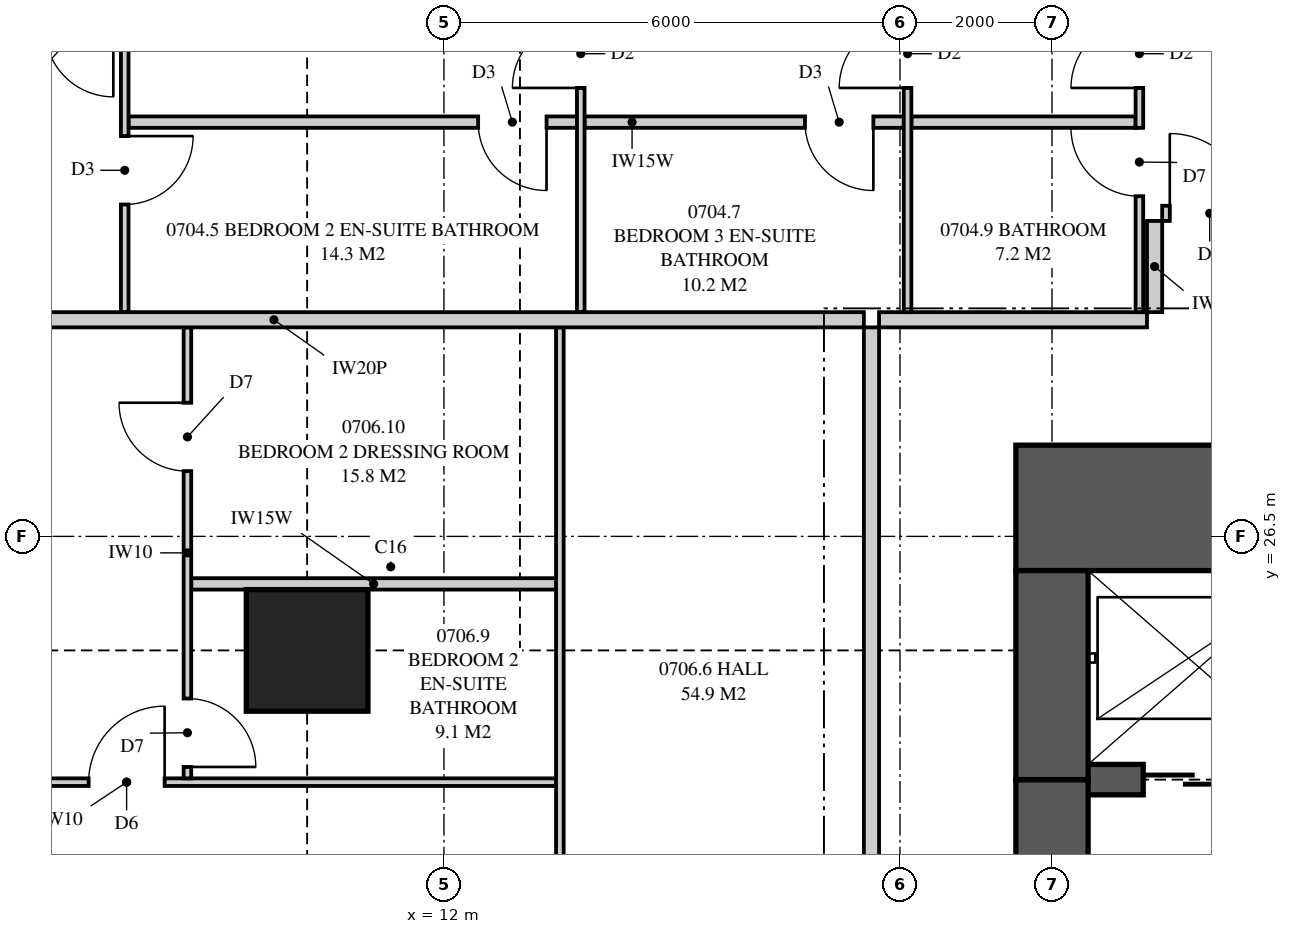
"""IFC4 building model, lengths in metres.
Left out: names, types, materials, properties, quantities, classifications, styles, units other than length and angle.
Written with IfcOpenShell. Run it as: python <this file> out.ifc"""

import sys

from ifc_helpers import new_model, si_unit, direction, frame, frame_2d, origin, origin_2d, place, context, subcontext, project, spatial, polyline, rectangle, outline, extrude, element, fill, save


model = new_model("IFC4")
c1 = context("Model", 3, precision=1e-05, world=origin(), true_north=direction((0.0, 1.0)))
c2 = subcontext(c1, "Body", "Model", "MODEL_VIEW")
j1 = project(units=[si_unit("LENGTHUNIT", "METRE"), si_unit("PLANEANGLEUNIT", "RADIAN")], contexts=[c1])
p1 = place(None, origin())
s1 = spatial("IfcSite", under=j1, at=p1, CompositionType="ELEMENT")
p2 = place(p1, origin())
s2 = spatial("IfcBuilding", under=s1, at=p2, CompositionType="ELEMENT")
p3 = place(p2, frame((0.0, 0.0, 31.05)))
s3 = spatial("IfcBuildingStorey", under=s2, at=p3, CompositionType="ELEMENT", Elevation=31.05)
p4 = place(p3, frame((10.2, 25.0, 0.0), z_axis=(0.0, 0.0, 1.0), x_axis=(1.0, 0.0, 0.0)))
e1 = element("IfcColumn", 1, at=p4, inside=s3, PredefinedType="COLUMN", context=c2, shape_type="SweptSolid", body=[
    extrude(rectangle(XDim=1.6, YDim=1.6, at=origin_2d()), origin(), (0.0, 0.0, 1.0), 3.35),
])
p5 = place(p3, frame((26.0, 26.875, 0.0), z_axis=(0.0, 0.0, 1.0), x_axis=(-1.0, 0.0, 0.0)))
e2 = element("IfcWall", 2, at=p5, inside=s3, PredefinedType="SHEAR", context=c2, shape_type="SweptSolid", body=[
    extrude(rectangle(XDim=6.475, YDim=1.65, at=frame_2d((3.238, 0.0))), origin(), (0.0, 0.0, 1.0), 3.35),
])
p6 = place(p5, frame((0.825, 0.0, 0.0)))
e3 = element("IfcOpeningElement", 3, at=p6, cuts=e2, PredefinedType="OPENING", context=c2, shape_type="SweptSolid", body=[
    extrude(rectangle(XDim=0.75, YDim=2.1, at=frame_2d((0.375, 1.05))), frame((0.0, 0.835, 0.0), z_axis=(0.0, -1.0, 0.0), x_axis=(1.0, 0.0, 0.0)), (0.0, 0.0, 1.0), 1.67),
])
p7 = place(p3, frame((20.0, 26.05, 0.0), z_axis=(0.0, 0.0, 1.0), x_axis=(0.0, -1.0, 0.0)))
e4 = element("IfcWall", 4, at=p7, inside=s3, PredefinedType="SHEAR", context=c2, shape_type="SweptSolid", body=[
    extrude(rectangle(XDim=2.75, YDim=0.95, at=frame_2d((1.375, 0.0))), origin(), (0.0, 0.0, 1.0), 3.35),
])
p8 = place(p3, frame((20.0, 23.3, 0.0), z_axis=(0.0, 0.0, 1.0), x_axis=(0.0, -1.0, 0.0)))
e5 = element("IfcWall", 5, at=p8, inside=s3, PredefinedType="SHEAR", context=c2, shape_type="SweptSolid", body=[
    extrude(rectangle(XDim=5.6, YDim=0.95, at=frame_2d((2.8, 0.0))), origin(), (0.0, 0.0, 1.0), 3.35),
])
p9 = place(p8, frame((3.4, 0.0, 0.0)))
e6 = element("IfcOpeningElement", 6, at=p9, cuts=e5, PredefinedType="OPENING", context=c2, shape_type="SweptSolid", body=[
    extrude(rectangle(XDim=1.2, YDim=2.2, at=frame_2d((0.6, 1.1))), frame((0.0, 0.485, 0.0), z_axis=(0.0, -1.0, 0.0), x_axis=(1.0, 0.0, 0.0)), (0.0, 0.0, 1.0), 0.97),
])
p10 = place(p3, frame((20.0, 23.3, 0.0), z_axis=(0.0, 0.0, 1.0), x_axis=(1.0, 0.0, 0.0)))
e7 = element("IfcWall", 7, at=p10, inside=s3, PredefinedType="SHEAR", context=c2, shape_type="SweptSolid", body=[
    extrude(rectangle(XDim=3.6, YDim=0.4, at=frame_2d((1.8, 0.0))), origin(), (0.0, 0.0, 1.0), 3.35),
])
p11 = place(p10, frame((1.2, 0.0, 0.0)))
e8 = element("IfcOpeningElement", 8, at=p11, cuts=e7, PredefinedType="OPENING", context=c2, shape_type="SweptSolid", body=[
    extrude(rectangle(XDim=1.2, YDim=2.1, at=frame_2d((0.6, 1.05))), frame((0.0, 0.21, 0.0), z_axis=(0.0, -1.0, 0.0), x_axis=(1.0, 0.0, 0.0)), (0.0, 0.0, 1.0), 0.42),
])
p12 = place(p3, frame((17.725, 29.35, 0.0), z_axis=(0.0, 0.0, 1.0), x_axis=(1.0, 0.0, 0.0)))
e9 = element("IfcWall", 9, at=p12, inside=s3, PredefinedType="PARTITIONING", context=c2, shape_type="SweptSolid", body=[
    extrude(rectangle(XDim=3.525, YDim=0.2, at=frame_2d((1.762, 0.0))), origin(), (0.0, 0.0, 1.0), 3.11),
])
p13 = place(p3, frame((7.8, 37.825, 0.0), z_axis=(0.0, 0.0, 1.0), x_axis=(0.0, -1.0, 0.0)))
e10 = element("IfcWall", 10, at=p13, inside=s3, PredefinedType="PARTITIONING", context=c2, shape_type="SweptSolid", body=[
    extrude(outline(polyline([(0.0, 0.0), (8.375, 0.0), (8.375, 3.11), (2.697, 3.11), (2.697, 2.15), (0.943, 2.15), (0.943, 3.11), (0.0, 3.11), (0.0, 0.0)])), frame((0.0, 0.05, 0.0), z_axis=(0.0, -1.0, 0.0), x_axis=(1.0, 0.0, 0.0)), (0.0, 0.0, 1.0), 0.1),
])
p14 = place(p13, frame((2.842, 0.0, 0.0)))
e11 = element("IfcOpeningElement", 11, at=p14, cuts=e10, PredefinedType="OPENING", context=c2, shape_type="SweptSolid", body=[
    extrude(rectangle(XDim=0.9, YDim=2.1, at=frame_2d((0.45, 1.05))), frame((0.0, 0.06, 0.0), z_axis=(0.0, -1.0, 0.0), x_axis=(1.0, 0.0, 0.0)), (0.0, 0.0, 1.0), 0.12),
])
p15 = place(p13, frame((6.059, 0.0, 0.0)))
e12 = element("IfcOpeningElement", 12, at=p15, cuts=e10, PredefinedType="OPENING", context=c2, shape_type="SweptSolid", body=[
    extrude(rectangle(XDim=0.9, YDim=2.1, at=frame_2d((0.45, 1.05))), frame((0.0, 0.06, 0.0), z_axis=(0.0, -1.0, 0.0), x_axis=(1.0, 0.0, 0.0)), (0.0, 0.0, 1.0), 0.12),
])
p16 = place(p3, frame((13.8, 37.825, 0.0), z_axis=(0.0, 0.0, 1.0), x_axis=(0.0, -1.0, 0.0)))
e13 = element("IfcWall", 13, at=p16, inside=s3, PredefinedType="PARTITIONING", context=c2, shape_type="SweptSolid", body=[
    extrude(outline(polyline([(1.635, 2.15), (0.0, 2.15), (0.0, 0.0), (8.375, 0.0), (8.375, 3.11), (1.635, 3.11), (1.635, 2.15)]), holes=[polyline([(1.021, 0.126), (0.529, 0.126), (0.529, 0.919), (1.021, 0.919), (1.021, 0.126)]), polyline([(1.021, 1.231), (0.529, 1.231), (0.529, 2.024), (1.021, 2.024), (1.021, 1.231)])]), frame((0.0, 0.05, 0.0), z_axis=(0.0, -1.0, 0.0), x_axis=(1.0, 0.0, 0.0)), (0.0, 0.0, 1.0), 0.1),
])
p17 = place(p16, frame((4.525, 0.0, 0.0)))
e14 = element("IfcOpeningElement", 14, at=p17, cuts=e13, PredefinedType="OPENING", context=c2, shape_type="SweptSolid", body=[
    extrude(rectangle(XDim=0.9, YDim=2.1, at=frame_2d((0.45, 1.05))), frame((0.0, 0.06, 0.0), z_axis=(0.0, -1.0, 0.0), x_axis=(1.0, 0.0, 0.0)), (0.0, 0.0, 1.0), 0.12),
])
p18 = place(p3, frame((18.1, 37.825, 0.0), z_axis=(0.0, 0.0, 1.0), x_axis=(0.0, -1.0, 0.0)))
e15 = element("IfcWall", 15, at=p18, inside=s3, PredefinedType="PARTITIONING", context=c2, shape_type="SweptSolid", body=[
    extrude(outline(polyline([(0.0, 0.0), (8.375, 0.0), (8.375, 3.11), (1.635, 3.11), (1.635, 2.15), (0.0, 2.15), (0.0, 3.11), (0.0, 0.0)])), frame((0.0, 0.05, 0.0), z_axis=(0.0, -1.0, 0.0), x_axis=(1.0, 0.0, 0.0)), (0.0, 0.0, 1.0), 0.1),
])
p19 = place(p18, frame((4.525, 0.0, 0.0)))
e16 = element("IfcOpeningElement", 16, at=p19, cuts=e15, PredefinedType="OPENING", context=c2, shape_type="SweptSolid", body=[
    extrude(rectangle(XDim=0.9, YDim=2.1, at=frame_2d((0.45, 1.05))), frame((0.0, 0.06, 0.0), z_axis=(0.0, -1.0, 0.0), x_axis=(1.0, 0.0, 0.0)), (0.0, 0.0, 1.0), 0.12),
])
p20 = place(p3, frame((21.15, 37.825, 0.0), z_axis=(0.0, 0.0, 1.0), x_axis=(0.0, -1.0, 0.0)))
e17 = element("IfcWall", 17, at=p20, inside=s3, PredefinedType="PARTITIONING", context=c2, shape_type="SweptSolid", body=[
    extrude(outline(polyline([(0.0, 0.0), (8.375, 0.0), (8.375, 3.11), (1.635, 3.11), (1.635, 2.15), (0.0, 2.15), (0.0, 3.11), (0.0, 0.0)])), frame((0.0, 0.05, 0.0), z_axis=(0.0, -1.0, 0.0), x_axis=(1.0, 0.0, 0.0)), (0.0, 0.0, 1.0), 0.1),
])
p21 = place(p20, frame((4.525, 0.0, 0.0)))
e18 = element("IfcOpeningElement", 18, at=p21, cuts=e17, PredefinedType="OPENING", context=c2, shape_type="SweptSolid", body=[
    extrude(rectangle(XDim=0.9, YDim=2.1, at=frame_2d((0.45, 1.05))), frame((0.0, 0.06, 0.0), z_axis=(0.0, -1.0, 0.0), x_axis=(1.0, 0.0, 0.0)), (0.0, 0.0, 1.0), 0.12),
])
p22 = place(p20, frame((5.95, 0.0, 0.0)))
e19 = element("IfcOpeningElement", 19, at=p22, cuts=e17, PredefinedType="OPENING", context=c2, shape_type="SweptSolid", body=[
    extrude(rectangle(XDim=0.9, YDim=2.1, at=frame_2d((0.45, 1.05))), frame((0.0, 0.06, 0.0), z_axis=(0.0, -1.0, 0.0), x_axis=(1.0, 0.0, 0.0)), (0.0, 0.0, 1.0), 0.12),
])
p23 = place(p3, frame((7.85, 31.95, 0.0), z_axis=(0.0, 0.0, 1.0), x_axis=(1.0, 0.0, 0.0)))
e20 = element("IfcWall", 20, at=p23, inside=s3, PredefinedType="PLUMBINGWALL", context=c2, shape_type="SweptSolid", body=[
    extrude(outline(polyline([(0.0, 0.0), (5.9, 0.0), (5.9, 3.11), (5.462, 3.11), (5.462, 2.541), (4.838, 2.541), (4.838, 3.11), (3.635, 3.11), (3.635, 2.51), (1.065, 2.51), (1.065, 3.11), (0.0, 3.11), (0.0, 0.0)])), frame((0.0, 0.075, 0.0), z_axis=(0.0, -1.0, 0.0), x_axis=(1.0, 0.0, 0.0)), (0.0, 0.0, 1.0), 0.15),
])
p24 = place(p23, frame((4.6, 0.0, 0.0)))
e21 = element("IfcOpeningElement", 21, at=p24, cuts=e20, PredefinedType="OPENING", context=c2, shape_type="SweptSolid", body=[
    extrude(rectangle(XDim=0.9, YDim=2.1, at=frame_2d((0.45, 1.05))), frame((0.0, 0.085, 0.0), z_axis=(0.0, -1.0, 0.0), x_axis=(1.0, 0.0, 0.0)), (0.0, 0.0, 1.0), 0.17),
])
p25 = place(p3, frame((13.85, 31.95, 0.0), z_axis=(0.0, 0.0, 1.0), x_axis=(1.0, 0.0, 0.0)))
e22 = element("IfcWall", 22, at=p25, inside=s3, PredefinedType="PLUMBINGWALL", context=c2, shape_type="SweptSolid", body=[
    extrude(rectangle(XDim=4.2, YDim=0.15, at=frame_2d((2.1, 0.0))), origin(), (0.0, 0.0, 1.0), 3.11),
])
p26 = place(p25, frame((2.9, 0.0, 0.0)))
e23 = element("IfcOpeningElement", 23, at=p26, cuts=e22, PredefinedType="OPENING", context=c2, shape_type="SweptSolid", body=[
    extrude(rectangle(XDim=0.9, YDim=2.1, at=frame_2d((0.45, 1.05))), frame((0.0, 0.085, 0.0), z_axis=(0.0, -1.0, 0.0), x_axis=(1.0, 0.0, 0.0)), (0.0, 0.0, 1.0), 0.17),
])
p27 = place(p3, frame((18.15, 31.95, 0.0), z_axis=(0.0, 0.0, 1.0), x_axis=(1.0, 0.0, 0.0)))
e24 = element("IfcWall", 24, at=p27, inside=s3, PredefinedType="PLUMBINGWALL", context=c2, shape_type="SweptSolid", body=[
    extrude(rectangle(XDim=2.95, YDim=0.15, at=frame_2d((1.475, 0.0))), origin(), (0.0, 0.0, 1.0), 3.11),
])
p28 = place(p3, frame((2.0, 29.35, 0.0), z_axis=(0.0, 0.0, 1.0), x_axis=(1.0, 0.0, 0.0)))
e25 = element("IfcWall", 25, at=p28, inside=s3, PredefinedType="PARTITIONING", context=c2, shape_type="SweptSolid", body=[
    extrude(outline(polyline([(0.0, 0.0), (15.525, 0.0), (15.525, 3.11), (11.337, 3.11), (11.337, 2.541), (10.663, 2.541), (10.663, 3.11), (9.51, 3.11), (9.51, 2.51), (6.89, 2.51), (6.89, 3.11), (2.969, 3.11), (2.969, 2.541), (2.577, 2.541), (2.577, 2.15), (0.733, 2.15), (0.733, 3.11), (0.0, 3.11), (0.0, 0.0)])), frame((0.0, 0.1, 0.0), z_axis=(0.0, -1.0, 0.0), x_axis=(1.0, 0.0, 0.0)), (0.0, 0.0, 1.0), 0.2),
])
p29 = place(p3, frame((13.525, 11.3, 0.0), z_axis=(0.0, 0.0, 1.0), x_axis=(0.0, 1.0, 0.0)))
e26 = element("IfcWall", 26, at=p29, inside=s3, PredefinedType="PARTITIONING", context=c2, shape_type="SweptSolid", body=[
    extrude(outline(polyline([(0.0, 0.0), (17.95, 0.0), (17.95, 3.11), (13.987, 3.11), (13.987, 2.541), (13.413, 2.541), (13.413, 3.11), (1.987, 3.11), (1.987, 2.541), (1.413, 2.541), (1.413, 3.11), (0.0, 3.11), (0.0, 0.0)])), frame((0.0, 0.05, 0.0), z_axis=(0.0, -1.0, 0.0), x_axis=(1.0, 0.0, 0.0)), (0.0, 0.0, 1.0), 0.1),
])
p30 = place(p29, frame((6.7, 0.0, 0.0)))
e27 = element("IfcOpeningElement", 27, at=p30, cuts=e26, PredefinedType="OPENING", context=c2, shape_type="SweptSolid", body=[
    extrude(rectangle(XDim=1.0, YDim=2.1, at=frame_2d((0.5, 1.05))), frame((0.0, 0.06, 0.0), z_axis=(0.0, -1.0, 0.0), x_axis=(1.0, 0.0, 0.0)), (0.0, 0.0, 1.0), 0.12),
])
p31 = place(p3, frame((2.175, 23.267, 0.0), z_axis=(0.0, 0.0, 1.0), x_axis=(1.0, 0.0, 0.0)))
e28 = element("IfcWall", 28, at=p31, inside=s3, PredefinedType="PARTITIONING", context=c2, shape_type="SweptSolid", body=[
    extrude(outline(polyline([(0.529, 2.15), (0.0, 2.15), (0.0, 0.0), (0.529, 0.0), (0.529, 0.274), (1.021, 0.274), (1.021, 0.0), (11.3, 0.0), (11.3, 3.11), (9.285, 3.11), (9.285, 2.51), (6.765, 2.51), (6.765, 3.11), (1.635, 3.11), (1.635, 2.15), (1.021, 2.15), (1.021, 1.876), (0.529, 1.876), (0.529, 2.15)])), frame((0.0, 0.05, 0.0), z_axis=(0.0, -1.0, 0.0), x_axis=(1.0, 0.0, 0.0)), (0.0, 0.0, 1.0), 0.1),
])
p32 = place(p31, frame((5.15, 0.0, 0.0)))
e29 = element("IfcOpeningElement", 29, at=p32, cuts=e28, PredefinedType="OPENING", context=c2, shape_type="SweptSolid", body=[
    extrude(rectangle(XDim=1.0, YDim=2.1, at=frame_2d((0.5, 1.05))), frame((0.0, 0.06, 0.0), z_axis=(0.0, -1.0, 0.0), x_axis=(1.0, 0.0, 0.0)), (0.0, 0.0, 1.0), 0.12),
])
p33 = place(p3, frame((21.45, 30.75, 0.0), z_axis=(0.0, 0.0, 1.0), x_axis=(1.0, 0.0, 0.0)))
e30 = element("IfcWall", 30, at=p33, inside=s3, PredefinedType="PARTITIONING", context=c2, shape_type="SweptSolid", body=[
    extrude(outline(polyline([(0.0, 0.0), (2.4, 0.0), (2.4, 3.11), (2.4, 2.541), (2.213, 2.541), (2.213, 3.11), (0.0, 3.11), (0.0, 0.0)])), frame((0.0, 0.1, 0.0), z_axis=(0.0, -1.0, 0.0), x_axis=(1.0, 0.0, 0.0)), (0.0, 0.0, 1.0), 0.2),
])
p34 = place(p33, frame((0.1, 0.0, 0.0)))
e31 = element("IfcOpeningElement", 31, at=p34, cuts=e30, PredefinedType="OPENING", context=c2, shape_type="SweptSolid", body=[
    extrude(rectangle(XDim=1.05, YDim=2.2, at=frame_2d((0.525, 1.1))), frame((0.0, 0.11, 0.0), z_axis=(0.0, -1.0, 0.0), x_axis=(1.0, 0.0, 0.0)), (0.0, 0.0, 1.0), 0.22),
])
p35 = place(p3, frame((21.35, 29.45, 0.0), z_axis=(0.0, 0.0, 1.0), x_axis=(0.0, 1.0, 0.0)))
e32 = element("IfcWall", 32, at=p35, inside=s3, PredefinedType="PARTITIONING", context=c2, shape_type="SweptSolid", body=[
    extrude(rectangle(XDim=1.2, YDim=0.2, at=frame_2d((0.6, 0.0))), origin(), (0.0, 0.0, 1.0), 3.11),
])
p36 = place(p3, frame((17.625, 19.9, 0.0), z_axis=(0.0, 0.0, 1.0), x_axis=(0.0, 1.0, 0.0)))
e33 = element("IfcWall", 33, at=p36, inside=s3, PredefinedType="PARTITIONING", context=c2, shape_type="SweptSolid", body=[
    extrude(outline(polyline([(0.0, 0.0), (9.35, 0.0), (9.35, 3.11), (5.437, 3.11), (5.437, 2.541), (4.763, 2.541), (4.763, 3.11), (0.0, 3.11), (0.0, 0.0)])), frame((0.0, 0.1, 0.0), z_axis=(0.0, -1.0, 0.0), x_axis=(1.0, 0.0, 0.0)), (0.0, 0.0, 1.0), 0.2),
])
p37 = place(p3, frame((8.625, 23.317, 0.0), z_axis=(0.0, 0.0, 1.0), x_axis=(0.0, 1.0, 0.0)))
e34 = element("IfcWall", 34, at=p37, inside=s3, PredefinedType="PARTITIONING", context=c2, shape_type="SweptSolid", body=[
    extrude(outline(polyline([(0.0, 0.0), (5.933, 0.0), (5.933, 3.11), (1.971, 3.11), (1.971, 2.541), (1.396, 2.541), (1.396, 3.11), (0.0, 3.11), (0.0, 0.0)])), frame((0.0, 0.05, 0.0), z_axis=(0.0, -1.0, 0.0), x_axis=(1.0, 0.0, 0.0)), (0.0, 0.0, 1.0), 0.1),
])
p38 = place(p37, frame((0.15, 0.0, 0.0)))
e35 = element("IfcOpeningElement", 35, at=p38, cuts=e34, PredefinedType="OPENING", context=c2, shape_type="SweptSolid", body=[
    extrude(rectangle(XDim=0.9, YDim=2.1, at=frame_2d((0.45, 1.05))), frame((0.0, 0.06, 0.0), z_axis=(0.0, -1.0, 0.0), x_axis=(1.0, 0.0, 0.0)), (0.0, 0.0, 1.0), 0.12),
])
p39 = place(p37, frame((4.042, 0.0, 0.0)))
e36 = element("IfcOpeningElement", 36, at=p39, cuts=e34, PredefinedType="OPENING", context=c2, shape_type="SweptSolid", body=[
    extrude(rectangle(XDim=0.9, YDim=2.1, at=frame_2d((0.45, 1.05))), frame((0.0, 0.06, 0.0), z_axis=(0.0, -1.0, 0.0), x_axis=(1.0, 0.0, 0.0)), (0.0, 0.0, 1.0), 0.12),
])
p40 = place(p3, frame((8.675, 25.875, 0.0), z_axis=(0.0, 0.0, 1.0), x_axis=(1.0, 0.0, 0.0)))
e37 = element("IfcWall", 37, at=p40, inside=s3, PredefinedType="PLUMBINGWALL", context=c2, shape_type="SweptSolid", body=[
    extrude(outline(polyline([(0.0, 0.0), (4.8, 0.0), (4.8, 3.11), (4.637, 3.11), (4.637, 2.541), (4.013, 2.541), (4.013, 3.11), (2.81, 3.11), (2.81, 2.51), (0.24, 2.51), (0.24, 3.11), (0.0, 3.11), (0.0, 0.0)])), frame((0.0, 0.075, 0.0), z_axis=(0.0, -1.0, 0.0), x_axis=(1.0, 0.0, 0.0)), (0.0, 0.0, 1.0), 0.15),
])
p41 = place(p34, origin())
e38 = element("IfcDoor", 38, at=p41, inside=s3, OperationType="SINGLE_SWING_LEFT", PredefinedType="DOOR", context=c2, shape_type="SweptSolid", body=[
    extrude(rectangle(XDim=1.05, YDim=2.2, at=frame_2d((0.525, 1.1))), frame((0.0, 0.025, 0.0), z_axis=(0.0, -1.0, 0.0), x_axis=(1.0, 0.0, 0.0)), (0.0, 0.0, 1.0), 0.05),
])
fill(e31, e38)
p42 = place(p17, frame((0.9, 0.0, 0.0), z_axis=(0.0, 0.0, 1.0), x_axis=(-1.0, 0.0, 0.0)))
e39 = element("IfcDoor", 39, at=p42, inside=s3, OperationType="SINGLE_SWING_LEFT", PredefinedType="DOOR", context=c2, shape_type="SweptSolid", body=[
    extrude(rectangle(XDim=0.9, YDim=2.1, at=frame_2d((0.45, 1.05))), frame((0.0, 0.025, 0.0), z_axis=(0.0, -1.0, 0.0), x_axis=(1.0, 0.0, 0.0)), (0.0, 0.0, 1.0), 0.05),
])
fill(e14, e39)
p43 = place(p24, frame((0.9, 0.0, 0.0), z_axis=(0.0, 0.0, 1.0), x_axis=(-1.0, 0.0, 0.0)))
e40 = element("IfcDoor", 40, at=p43, inside=s3, OperationType="SINGLE_SWING_LEFT", PredefinedType="DOOR", context=c2, shape_type="SweptSolid", body=[
    extrude(rectangle(XDim=0.9, YDim=2.1, at=frame_2d((0.45, 1.05))), frame((0.0, 0.025, 0.0), z_axis=(0.0, -1.0, 0.0), x_axis=(1.0, 0.0, 0.0)), (0.0, 0.0, 1.0), 0.05),
])
fill(e21, e40)
p44 = place(p19, frame((0.9, 0.0, 0.0), z_axis=(0.0, 0.0, 1.0), x_axis=(-1.0, 0.0, 0.0)))
e41 = element("IfcDoor", 41, at=p44, inside=s3, OperationType="SINGLE_SWING_LEFT", PredefinedType="DOOR", context=c2, shape_type="SweptSolid", body=[
    extrude(rectangle(XDim=0.9, YDim=2.1, at=frame_2d((0.45, 1.05))), frame((0.0, 0.025, 0.0), z_axis=(0.0, -1.0, 0.0), x_axis=(1.0, 0.0, 0.0)), (0.0, 0.0, 1.0), 0.05),
])
fill(e16, e41)
p45 = place(p26, frame((0.9, 0.0, 0.0), z_axis=(0.0, 0.0, 1.0), x_axis=(-1.0, 0.0, 0.0)))
e42 = element("IfcDoor", 42, at=p45, inside=s3, OperationType="SINGLE_SWING_LEFT", PredefinedType="DOOR", context=c2, shape_type="SweptSolid", body=[
    extrude(rectangle(XDim=0.9, YDim=2.1, at=frame_2d((0.45, 1.05))), frame((0.0, 0.025, 0.0), z_axis=(0.0, -1.0, 0.0), x_axis=(1.0, 0.0, 0.0)), (0.0, 0.0, 1.0), 0.05),
])
fill(e23, e42)
p46 = place(p21, frame((0.9, 0.0, 0.0), z_axis=(0.0, 0.0, 1.0), x_axis=(-1.0, 0.0, 0.0)))
e43 = element("IfcDoor", 43, at=p46, inside=s3, OperationType="SINGLE_SWING_LEFT", PredefinedType="DOOR", context=c2, shape_type="SweptSolid", body=[
    extrude(rectangle(XDim=0.9, YDim=2.1, at=frame_2d((0.45, 1.05))), frame((0.0, 0.025, 0.0), z_axis=(0.0, -1.0, 0.0), x_axis=(1.0, 0.0, 0.0)), (0.0, 0.0, 1.0), 0.05),
])
fill(e18, e43)
p47 = place(p22, frame((0.9, 0.0, 0.0), z_axis=(0.0, 0.0, 1.0), x_axis=(-1.0, 0.0, 0.0)))
e44 = element("IfcDoor", 44, at=p47, inside=s3, OperationType="SINGLE_SWING_RIGHT", PredefinedType="DOOR", context=c2, shape_type="SweptSolid", body=[
    extrude(rectangle(XDim=0.9, YDim=2.1, at=frame_2d((0.45, 1.05))), frame((0.0, 0.025, 0.0), z_axis=(0.0, -1.0, 0.0), x_axis=(1.0, 0.0, 0.0)), (0.0, 0.0, 1.0), 0.05),
])
fill(e19, e44)
p48 = place(p15, origin())
e45 = element("IfcDoor", 45, at=p48, inside=s3, OperationType="SINGLE_SWING_LEFT", PredefinedType="DOOR", context=c2, shape_type="SweptSolid", body=[
    extrude(rectangle(XDim=0.9, YDim=2.1, at=frame_2d((0.45, 1.05))), frame((0.0, 0.025, 0.0), z_axis=(0.0, -1.0, 0.0), x_axis=(1.0, 0.0, 0.0)), (0.0, 0.0, 1.0), 0.05),
])
fill(e12, e45)
p49 = place(p32, origin())
e46 = element("IfcDoor", 46, at=p49, inside=s3, OperationType="SINGLE_SWING_RIGHT", PredefinedType="DOOR", context=c2, shape_type="SweptSolid", body=[
    extrude(rectangle(XDim=1.0, YDim=2.1, at=frame_2d((0.5, 1.05))), frame((0.0, 0.025, 0.0), z_axis=(0.0, -1.0, 0.0), x_axis=(1.0, 0.0, 0.0)), (0.0, 0.0, 1.0), 0.05),
])
fill(e29, e46)
p50 = place(p38, frame((0.9, 0.0, 0.0), z_axis=(0.0, 0.0, 1.0), x_axis=(-1.0, 0.0, 0.0)))
e47 = element("IfcDoor", 47, at=p50, inside=s3, OperationType="SINGLE_SWING_RIGHT", PredefinedType="DOOR", context=c2, shape_type="SweptSolid", body=[
    extrude(rectangle(XDim=0.9, YDim=2.1, at=frame_2d((0.45, 1.05))), frame((0.0, 0.025, 0.0), z_axis=(0.0, -1.0, 0.0), x_axis=(1.0, 0.0, 0.0)), (0.0, 0.0, 1.0), 0.05),
])
fill(e35, e47)
p51 = place(p39, origin())
e48 = element("IfcDoor", 48, at=p51, inside=s3, OperationType="SINGLE_SWING_RIGHT", PredefinedType="DOOR", context=c2, shape_type="SweptSolid", body=[
    extrude(rectangle(XDim=0.9, YDim=2.1, at=frame_2d((0.45, 1.05))), frame((0.0, 0.025, 0.0), z_axis=(0.0, -1.0, 0.0), x_axis=(1.0, 0.0, 0.0)), (0.0, 0.0, 1.0), 0.05),
])
fill(e36, e48)
p52 = place(p11, origin())
e49 = element("IfcDoor", 49, at=p52, inside=s3, OperationType="SLIDING_TO_LEFT", PredefinedType="DOOR", context=c2, shape_type="SweptSolid", body=[
    extrude(rectangle(XDim=1.2, YDim=2.1, at=frame_2d((0.6, 1.05))), frame((0.0, 0.025, 0.0), z_axis=(0.0, -1.0, 0.0), x_axis=(1.0, 0.0, 0.0)), (0.0, 0.0, 1.0), 0.05),
])
fill(e8, e49)
save(model, sys.argv[1])
